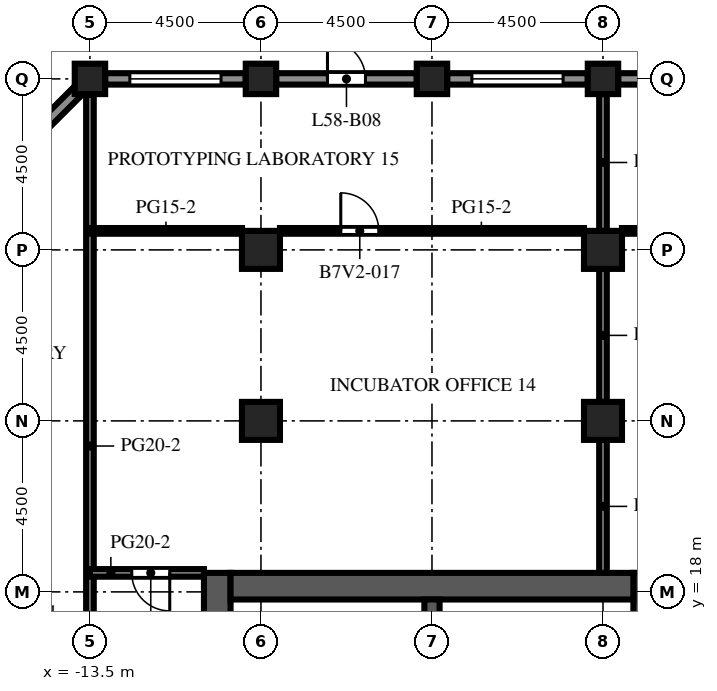
"""IFC4 building model, lengths in metres.
Left out: names, types, materials, properties, quantities, classifications, styles, units other than length and angle.
Written with IfcOpenShell. Run it as: python <this file> out.ifc"""

import sys

from ifc_helpers import new_model, si_unit, direction, frame, frame_2d, origin, origin_2d, place, context, subcontext, project, spatial, rectangle, extrude, element, fill, save


model = new_model("IFC4")
c1 = context("Model", 3, precision=1e-05, world=origin(), true_north=direction((0.0, 1.0)))
c2 = subcontext(c1, "Body", "Model", "MODEL_VIEW")
j1 = project(units=[si_unit("LENGTHUNIT", "METRE"), si_unit("PLANEANGLEUNIT", "RADIAN")], contexts=[c1])
p1 = place(None, origin())
s1 = spatial("IfcSite", under=j1, at=p1, CompositionType="ELEMENT")
p2 = place(p1, origin())
s2 = spatial("IfcBuilding", under=s1, at=p2, CompositionType="ELEMENT")
p3 = place(p2, frame((0.0, 0.0, 256.2)))
s3 = spatial("IfcBuildingStorey", under=s2, at=p3, CompositionType="ELEMENT", Elevation=256.2)
for number, where, z_axis, x_axis in (
    (1, (-13.5, 31.5, 0.0), (0.0, 0.0, 1.0), (1.0, 0.0, 0.0)),
    (2, (-9.0, 31.5, 0.0), (0.0, 0.0, 1.0), (1.0, 0.0, 0.0)),
    (3, (-4.5, 31.5, 0.0), (0.0, 0.0, 1.0), (1.0, 0.0, 0.0)),
    (4, (0.0, 31.5, 0.0), (0.0, 0.0, 1.0), (1.0, 0.0, 0.0)),
):
    element("IfcColumn", number, at=place(p3, frame(where, z_axis=z_axis, x_axis=x_axis)), inside=s3, PredefinedType="COLUMN", context=c2, shape_type="SweptSolid", body=[
        extrude(rectangle(XDim=0.8, YDim=0.8, at=origin_2d()), origin(), (0.0, 0.0, 1.0), 4.1),
    ])
for number, where, z_axis, x_axis in (
    (5, (-9.0, 22.5, 0.0), (0.0, 0.0, 1.0), (1.0, 0.0, 0.0)),
    (6, (-9.0, 27.0, 0.0), (0.0, 0.0, 1.0), (1.0, 0.0, 0.0)),
    (7, (0.0, 22.5, 0.0), (0.0, 0.0, 1.0), (1.0, 0.0, 0.0)),
    (8, (0.0, 27.0, 0.0), (0.0, 0.0, 1.0), (1.0, 0.0, 0.0)),
):
    element("IfcColumn", number, at=place(p3, frame(where, z_axis=z_axis, x_axis=x_axis)), inside=s3, PredefinedType="COLUMN", context=c2, shape_type="SweptSolid", body=[
        extrude(rectangle(XDim=1.0, YDim=1.0, at=origin_2d()), origin(), (0.0, 0.0, 1.0), 4.1),
    ])
p4 = place(p3, frame((-10.15, -9.0, 0.0), z_axis=(0.0, 0.0, 1.0), x_axis=(0.0, 1.0, 0.0)))
e9 = element("IfcWall", 9, at=p4, inside=s3, PredefinedType="SHEAR", context=c2, shape_type="SweptSolid", body=[
    extrude(rectangle(XDim=27.5, YDim=0.7, at=frame_2d((13.75, 0.0))), origin(), (0.0, 0.0, 1.0), 4.1),
])
p5 = place(p4, frame((12.55, 0.0, 0.0)))
e10 = element("IfcOpeningElement", 10, at=p5, cuts=e9, PredefinedType="OPENING", context=c2, shape_type="SweptSolid", body=[
    extrude(rectangle(XDim=2.4, YDim=2.4, at=frame_2d((1.2, 1.2))), frame((0.0, 0.36, 0.0), z_axis=(0.0, -1.0, 0.0), x_axis=(1.0, 0.0, 0.0)), (0.0, 0.0, 1.0), 0.72),
])
p6 = place(p4, frame((6.825, 0.0, 0.0)))
e11 = element("IfcOpeningElement", 11, at=p6, cuts=e9, PredefinedType="OPENING", context=c2, shape_type="SweptSolid", body=[
    extrude(rectangle(XDim=1.2, YDim=2.1, at=frame_2d((0.6, 1.05))), frame((0.0, 0.36, 0.0), z_axis=(0.0, -1.0, 0.0), x_axis=(1.0, 0.0, 0.0)), (0.0, 0.0, 1.0), 0.72),
])
p7 = place(p4, frame((19.475, 0.0, 0.0)))
e12 = element("IfcOpeningElement", 12, at=p7, cuts=e9, PredefinedType="OPENING", context=c2, shape_type="SweptSolid", body=[
    extrude(rectangle(XDim=1.2, YDim=2.1, at=frame_2d((0.6, 1.05))), frame((0.0, 0.36, 0.0), z_axis=(0.0, -1.0, 0.0), x_axis=(1.0, 0.0, 0.0)), (0.0, 0.0, 1.0), 0.72),
])
p8 = place(p3, frame((1.15, -9.0, 0.0), z_axis=(0.0, 0.0, 1.0), x_axis=(0.0, 1.0, 0.0)))
e13 = element("IfcWall", 13, at=p8, inside=s3, PredefinedType="SHEAR", context=c2, shape_type="SweptSolid", body=[
    extrude(rectangle(XDim=27.5, YDim=0.7, at=frame_2d((13.75, 0.0))), origin(), (0.0, 0.0, 1.0), 4.1),
])
p9 = place(p8, frame((12.55, 0.0, 0.0)))
e14 = element("IfcOpeningElement", 14, at=p9, cuts=e13, PredefinedType="OPENING", context=c2, shape_type="SweptSolid", body=[
    extrude(rectangle(XDim=2.4, YDim=2.4, at=frame_2d((1.2, 1.2))), frame((0.0, 0.36, 0.0), z_axis=(0.0, -1.0, 0.0), x_axis=(1.0, 0.0, 0.0)), (0.0, 0.0, 1.0), 0.72),
])
p10 = place(p8, frame((3.788, 0.0, 0.0)))
e15 = element("IfcOpeningElement", 15, at=p10, cuts=e13, PredefinedType="OPENING", context=c2, shape_type="SweptSolid", body=[
    extrude(rectangle(XDim=0.968, YDim=2.1, at=frame_2d((0.484, 1.05))), frame((0.0, 0.36, 0.0), z_axis=(0.0, -1.0, 0.0), x_axis=(1.0, 0.0, 0.0)), (0.0, 0.0, 1.0), 0.72),
])
p11 = place(p8, frame((23.54, 0.0, 0.0)))
e16 = element("IfcOpeningElement", 16, at=p11, cuts=e13, PredefinedType="OPENING", context=c2, shape_type="SweptSolid", body=[
    extrude(rectangle(XDim=1.2, YDim=2.1, at=frame_2d((0.6, 1.05))), frame((0.0, 0.36, 0.0), z_axis=(0.0, -1.0, 0.0), x_axis=(1.0, 0.0, 0.0)), (0.0, 0.0, 1.0), 0.72),
])
p12 = place(p3, frame((-9.8, 18.15, 0.0), z_axis=(0.0, 0.0, 1.0), x_axis=(1.0, 0.0, 0.0)))
e17 = element("IfcWall", 17, at=p12, inside=s3, PredefinedType="SHEAR", context=c2, shape_type="SweptSolid", body=[
    extrude(rectangle(XDim=10.6, YDim=0.7, at=frame_2d((5.3, 0.0))), origin(), (0.0, 0.0, 1.0), 4.1),
])
p13 = place(p3, frame((-4.5, 10.2, 0.0), z_axis=(0.0, 0.0, 1.0), x_axis=(0.0, 1.0, 0.0)))
e18 = element("IfcWall", 18, at=p13, inside=s3, PredefinedType="SHEAR", context=c2, shape_type="SweptSolid", body=[
    extrude(rectangle(XDim=7.6, YDim=0.4, at=frame_2d((3.8, 0.0))), origin(), (0.0, 0.0, 1.0), 4.1),
])
p14 = place(p3, frame((0.4, 31.5, 0.0), z_axis=(0.0, 0.0, 1.0), x_axis=(1.0, 0.0, 0.0)))
e19 = element("IfcWall", 19, at=p14, inside=s3, PredefinedType="SOLIDWALL", context=c2, shape_type="SweptSolid", body=[
    extrude(rectangle(XDim=3.7, YDim=0.3, at=frame_2d((1.85, 0.0))), origin(), (0.0, 0.0, 1.0), 2.7),
])
p15 = place(p14, frame((0.65, 0.0, 0.8)))
e20 = element("IfcOpeningElement", 20, at=p15, cuts=e19, PredefinedType="OPENING", context=c2, shape_type="SweptSolid", body=[
    extrude(rectangle(XDim=2.4, YDim=1.7, at=frame_2d((1.2, 0.85))), frame((0.0, 0.16, 0.0), z_axis=(0.0, -1.0, 0.0), x_axis=(1.0, 0.0, 0.0)), (0.0, 0.0, 1.0), 0.32),
])
p16 = place(p3, frame((-4.1, 31.5, 0.0), z_axis=(0.0, 0.0, 1.0), x_axis=(1.0, 0.0, 0.0)))
e21 = element("IfcWall", 21, at=p16, inside=s3, PredefinedType="SOLIDWALL", context=c2, shape_type="SweptSolid", body=[
    extrude(rectangle(XDim=3.7, YDim=0.3, at=frame_2d((1.85, 0.0))), origin(), (0.0, 0.0, 1.0), 2.7),
])
p17 = place(p16, frame((0.65, 0.0, 0.8)))
e22 = element("IfcOpeningElement", 22, at=p17, cuts=e21, PredefinedType="OPENING", context=c2, shape_type="SweptSolid", body=[
    extrude(rectangle(XDim=2.4, YDim=1.7, at=frame_2d((1.2, 0.85))), frame((0.0, 0.16, 0.0), z_axis=(0.0, -1.0, 0.0), x_axis=(1.0, 0.0, 0.0)), (0.0, 0.0, 1.0), 0.32),
])
p18 = place(p3, frame((-8.6, 31.5, 0.0), z_axis=(0.0, 0.0, 1.0), x_axis=(1.0, 0.0, 0.0)))
e23 = element("IfcWall", 23, at=p18, inside=s3, PredefinedType="SOLIDWALL", context=c2, shape_type="SweptSolid", body=[
    extrude(rectangle(XDim=3.7, YDim=0.3, at=frame_2d((1.85, 0.0))), origin(), (0.0, 0.0, 1.0), 2.7),
])
p19 = place(p18, frame((1.35, 0.0, 0.0)))
e24 = element("IfcOpeningElement", 24, at=p19, cuts=e23, PredefinedType="OPENING", context=c2, shape_type="SweptSolid", body=[
    extrude(rectangle(XDim=1.0, YDim=2.2, at=frame_2d((0.5, 1.1))), frame((0.0, 0.16, 0.0), z_axis=(0.0, -1.0, 0.0), x_axis=(1.0, 0.0, 0.0)), (0.0, 0.0, 1.0), 0.32),
])
p20 = place(p3, frame((-13.1, 31.5, 0.0), z_axis=(0.0, 0.0, 1.0), x_axis=(1.0, 0.0, 0.0)))
e25 = element("IfcWall", 25, at=p20, inside=s3, PredefinedType="SOLIDWALL", context=c2, shape_type="SweptSolid", body=[
    extrude(rectangle(XDim=3.7, YDim=0.3, at=frame_2d((1.85, 0.0))), origin(), (0.0, 0.0, 1.0), 2.7),
])
p21 = place(p20, frame((0.65, 0.0, 0.8)))
e26 = element("IfcOpeningElement", 26, at=p21, cuts=e25, PredefinedType="OPENING", context=c2, shape_type="SweptSolid", body=[
    extrude(rectangle(XDim=2.4, YDim=1.7, at=frame_2d((1.2, 0.85))), frame((0.0, 0.16, 0.0), z_axis=(0.0, -1.0, 0.0), x_axis=(1.0, 0.0, 0.0)), (0.0, 0.0, 1.0), 0.32),
])
p22 = place(p3, frame((-17.706, 27.294, 0.0), z_axis=(0.0, 0.0, 1.0), x_axis=(0.707106781187, 0.707106781187, 0.0)))
e27 = element("IfcWall", 27, at=p22, inside=s3, PredefinedType="SOLIDWALL", context=c2, shape_type="SweptSolid", body=[
    extrude(rectangle(XDim=5.532, YDim=0.3, at=frame_2d((2.766, 0.0))), origin(), (0.0, 0.0, 1.0), 2.7),
])
p23 = place(p22, frame((2.166, 0.0, 0.0)))
e28 = element("IfcOpeningElement", 28, at=p23, cuts=e27, PredefinedType="OPENING", context=c2, shape_type="SweptSolid", body=[
    extrude(rectangle(XDim=1.2, YDim=2.2, at=frame_2d((0.6, 1.1))), frame((0.0, 0.16, 0.0), z_axis=(0.0, -1.0, 0.0), x_axis=(1.0, 0.0, 0.0)), (0.0, 0.0, 1.0), 0.32),
])
p24 = place(p3, frame((-0.5, 15.14, 0.0), z_axis=(0.0, 0.0, 1.0), x_axis=(0.0, 1.0, 0.0)))
e29 = element("IfcWall", 29, at=p24, inside=s3, PredefinedType="PARTITIONING", context=c2, shape_type="SweptSolid", body=[
    extrude(rectangle(XDim=2.66, YDim=0.1, at=frame_2d((1.33, 0.0))), origin(), (0.0, 0.0, 1.0), 3.5),
])
p25 = place(p24, frame((0.83, 0.0, 0.0)))
e30 = element("IfcOpeningElement", 30, at=p25, cuts=e29, PredefinedType="OPENING", context=c2, shape_type="SweptSolid", body=[
    extrude(rectangle(XDim=1.0, YDim=2.1, at=frame_2d((0.5, 1.05))), frame((0.0, 0.06, 0.0), z_axis=(0.0, -1.0, 0.0), x_axis=(1.0, 0.0, 0.0)), (0.0, 0.0, 1.0), 0.12),
])
p26 = place(p3, frame((-13.5, 6.25, 0.0), z_axis=(0.0, 0.0, 1.0), x_axis=(0.0, 1.0, 0.0)))
e31 = element("IfcWall", 31, at=p26, inside=s3, PredefinedType="PARTITIONING", context=c2, shape_type="SweptSolid", body=[
    extrude(rectangle(XDim=24.827, YDim=0.2, at=frame_2d((12.414, 0.0))), origin(), (0.0, 0.0, 1.0), 3.5),
])
p27 = place(p26, frame((5.35, 0.0, 0.0)))
e32 = element("IfcOpeningElement", 32, at=p27, cuts=e31, PredefinedType="OPENING", context=c2, shape_type="SweptSolid", body=[
    extrude(rectangle(XDim=1.0, YDim=2.1, at=frame_2d((0.5, 1.05))), frame((0.0, 0.11, 0.0), z_axis=(0.0, -1.0, 0.0), x_axis=(1.0, 0.0, 0.0)), (0.0, 0.0, 1.0), 0.22),
])
for number, where, z_axis, x_axis in (
    (33, (0.0, 18.5, 0.0), (0.0, 0.0, 1.0), (0.0, 1.0, 0.0)),
    (34, (0.0, 23.0, 0.0), (0.0, 0.0, 1.0), (0.0, 1.0, 0.0)),
):
    element("IfcWall", number, at=place(p3, frame(where, z_axis=z_axis, x_axis=x_axis)), inside=s3, PredefinedType="PARTITIONING", context=c2, shape_type="SweptSolid", body=[
        extrude(rectangle(XDim=3.5, YDim=0.2, at=frame_2d((1.75, 0.0))), origin(), (0.0, 0.0, 1.0), 3.5),
    ])
p28 = place(p3, frame((0.0, 27.5, 0.0), z_axis=(0.0, 0.0, 1.0), x_axis=(0.0, 1.0, 0.0)))
e35 = element("IfcWall", 35, at=p28, inside=s3, PredefinedType="PARTITIONING", context=c2, shape_type="SweptSolid", body=[
    extrude(rectangle(XDim=3.6, YDim=0.2, at=frame_2d((1.8, 0.0))), origin(), (0.0, 0.0, 1.0), 3.5),
])
p29 = place(p3, frame((-13.5, 18.5, 0.0), z_axis=(0.0, 0.0, 1.0), x_axis=(1.0, 0.0, 0.0)))
e36 = element("IfcWall", 36, at=p29, inside=s3, PredefinedType="PARTITIONING", context=c2, shape_type="SweptSolid", body=[
    extrude(rectangle(XDim=3.0, YDim=0.2, at=frame_2d((1.5, 0.0))), origin(), (0.0, 0.0, 1.0), 3.5),
])
p30 = place(p29, frame((1.1, 0.0, 0.0)))
e37 = element("IfcOpeningElement", 37, at=p30, cuts=e36, PredefinedType="OPENING", context=c2, shape_type="SweptSolid", body=[
    extrude(rectangle(XDim=1.0, YDim=2.1, at=frame_2d((0.5, 1.05))), frame((0.0, 0.11, 0.0), z_axis=(0.0, -1.0, 0.0), x_axis=(1.0, 0.0, 0.0)), (0.0, 0.0, 1.0), 0.22),
])
p31 = place(p3, frame((-13.5, 27.5, 0.0), z_axis=(0.0, 0.0, 1.0), x_axis=(1.0, 0.0, 0.0)))
e38 = element("IfcWall", 38, at=p31, inside=s3, PredefinedType="PARTITIONING", context=c2, shape_type="SweptSolid", body=[
    extrude(rectangle(XDim=4.0, YDim=0.15, at=frame_2d((2.0, 0.0))), origin(), (0.0, 0.0, 1.0), 3.5),
])
p32 = place(p3, frame((-8.5, 27.5, 0.0), z_axis=(0.0, 0.0, 1.0), x_axis=(1.0, 0.0, 0.0)))
e39 = element("IfcWall", 39, at=p32, inside=s3, PredefinedType="PARTITIONING", context=c2, shape_type="SweptSolid", body=[
    extrude(rectangle(XDim=8.0, YDim=0.15, at=frame_2d((4.0, 0.0))), origin(), (0.0, 0.0, 1.0), 3.5),
])
p33 = place(p32, frame((1.6, 0.0, 0.0)))
e40 = element("IfcOpeningElement", 40, at=p33, cuts=e39, PredefinedType="OPENING", context=c2, shape_type="SweptSolid", body=[
    extrude(rectangle(XDim=1.0, YDim=2.1, at=frame_2d((0.5, 1.05))), frame((0.0, 0.085, 0.0), z_axis=(0.0, -1.0, 0.0), x_axis=(1.0, 0.0, 0.0)), (0.0, 0.0, 1.0), 0.17),
])
p34 = place(p3, frame((0.5, 27.5, 0.0), z_axis=(0.0, 0.0, 1.0), x_axis=(1.0, 0.0, 0.0)))
e41 = element("IfcWall", 41, at=p34, inside=s3, PredefinedType="PARTITIONING", context=c2, shape_type="SweptSolid", body=[
    extrude(rectangle(XDim=8.0, YDim=0.15, at=frame_2d((4.0, 0.0))), origin(), (0.0, 0.0, 1.0), 3.5),
])
p35 = place(p17, origin())
e42 = element("IfcWindow", 42, at=p35, inside=s3, PartitioningType="SINGLE_PANEL", PredefinedType="WINDOW", context=c2, shape_type="SweptSolid", body=[
    extrude(rectangle(XDim=2.4, YDim=1.7, at=frame_2d((1.2, 0.85))), frame((0.0, 0.03, 0.0), z_axis=(0.0, -1.0, 0.0), x_axis=(1.0, 0.0, 0.0)), (0.0, 0.0, 1.0), 0.06),
])
fill(e22, e42)
p36 = place(p19, origin())
e43 = element("IfcDoor", 43, at=p36, inside=s3, OperationType="SINGLE_SWING_LEFT", PredefinedType="DOOR", context=c2, shape_type="SweptSolid", body=[
    extrude(rectangle(XDim=1.0, YDim=2.2, at=frame_2d((0.5, 1.1))), frame((0.0, 0.025, 0.0), z_axis=(0.0, -1.0, 0.0), x_axis=(1.0, 0.0, 0.0)), (0.0, 0.0, 1.0), 0.05),
])
fill(e24, e43)
p37 = place(p21, origin())
e44 = element("IfcWindow", 44, at=p37, inside=s3, PartitioningType="SINGLE_PANEL", PredefinedType="WINDOW", context=c2, shape_type="SweptSolid", body=[
    extrude(rectangle(XDim=2.4, YDim=1.7, at=frame_2d((1.2, 0.85))), frame((0.0, 0.03, 0.0), z_axis=(0.0, -1.0, 0.0), x_axis=(1.0, 0.0, 0.0)), (0.0, 0.0, 1.0), 0.06),
])
fill(e26, e44)
p38 = place(p30, origin())
e45 = element("IfcDoor", 45, at=p38, inside=s3, OperationType="SINGLE_SWING_RIGHT", PredefinedType="DOOR", context=c2, shape_type="SweptSolid", body=[
    extrude(rectangle(XDim=1.0, YDim=2.1, at=frame_2d((0.5, 1.05))), frame((0.0, 0.025, 0.0), z_axis=(0.0, -1.0, 0.0), x_axis=(1.0, 0.0, 0.0)), (0.0, 0.0, 1.0), 0.05),
])
fill(e37, e45)
p39 = place(p33, origin())
e46 = element("IfcDoor", 46, at=p39, inside=s3, OperationType="SINGLE_SWING_LEFT", PredefinedType="DOOR", context=c2, shape_type="SweptSolid", body=[
    extrude(rectangle(XDim=1.0, YDim=2.1, at=frame_2d((0.5, 1.05))), frame((0.0, 0.025, 0.0), z_axis=(0.0, -1.0, 0.0), x_axis=(1.0, 0.0, 0.0)), (0.0, 0.0, 1.0), 0.05),
])
fill(e40, e46)
save(model, sys.argv[1])
